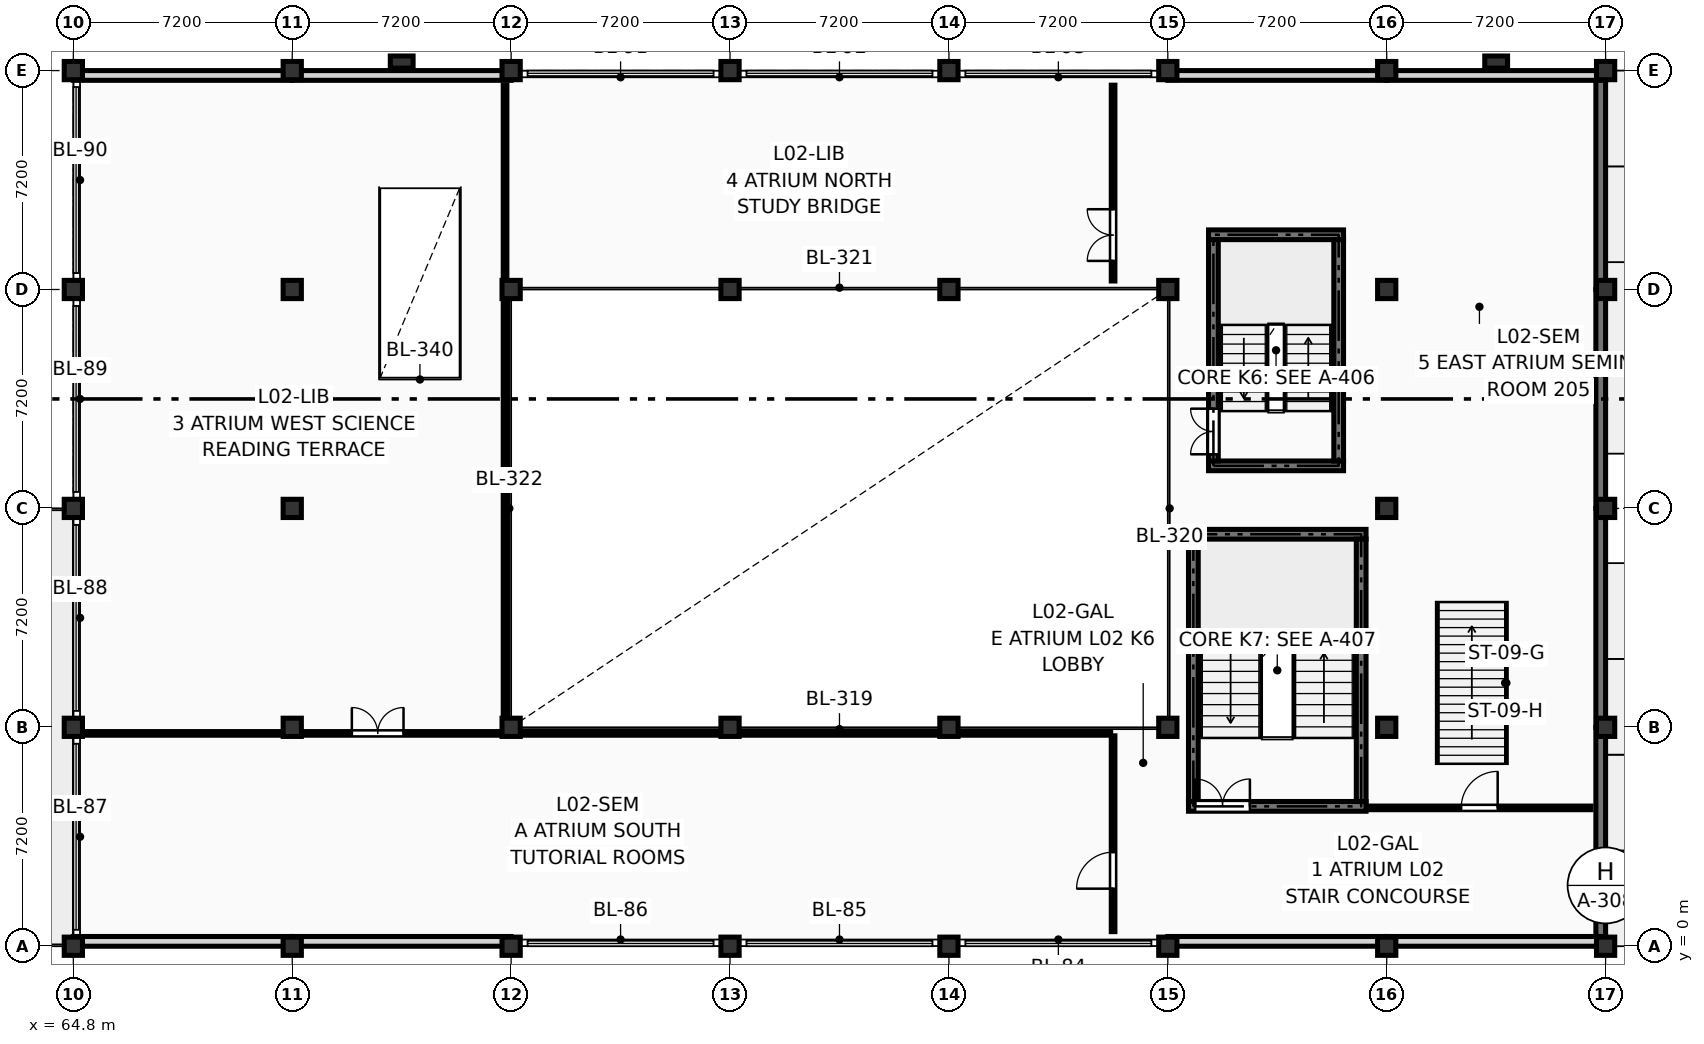
"""IFC4 building model, lengths in metres.
Left out: names, types, materials, properties, quantities, classifications, styles, units other than length and angle.
Written with IfcOpenShell. Run it as: python <this file> out.ifc"""

import sys

from ifc_helpers import new_model, si_unit, direction, frame, frame_2d, origin, origin_2d, place, context, subcontext, project, spatial, rectangle, extrude, element, fill, save


model = new_model("IFC4")
c1 = context("Model", 3, precision=1e-05, world=origin(), true_north=direction((0.0, 1.0)))
c2 = subcontext(c1, "Body", "Model", "MODEL_VIEW")
j1 = project(units=[si_unit("LENGTHUNIT", "METRE"), si_unit("PLANEANGLEUNIT", "RADIAN")], contexts=[c1])
p1 = place(None, origin())
s1 = spatial("IfcSite", under=j1, at=p1, CompositionType="ELEMENT")
p2 = place(p1, origin())
s2 = spatial("IfcBuilding", under=s1, at=p2, CompositionType="ELEMENT")
p3 = place(p2, frame((0.0, 0.0, 8.55)))
s3 = spatial("IfcBuildingStorey", under=s2, at=p3, CompositionType="ELEMENT", Elevation=8.55)
for number, where, z_axis, x_axis in (
    (1, (64.8, 0.0, 0.0), (0.0, 0.0, 1.0), (1.0, 0.0, 0.0)),
    (2, (64.8, 7.2, 0.0), (0.0, 0.0, 1.0), (1.0, 0.0, 0.0)),
    (3, (64.8, 14.4, 0.0), (0.0, 0.0, 1.0), (1.0, 0.0, 0.0)),
    (4, (64.8, 21.6, 0.0), (0.0, 0.0, 1.0), (1.0, 0.0, 0.0)),
    (5, (64.8, 28.8, 0.0), (0.0, 0.0, 1.0), (1.0, 0.0, 0.0)),
    (6, (72.0, 0.0, 0.0), (0.0, 0.0, 1.0), (1.0, 0.0, 0.0)),
    (7, (72.0, 7.2, 0.0), (0.0, 0.0, 1.0), (1.0, 0.0, 0.0)),
    (8, (72.0, 14.4, 0.0), (0.0, 0.0, 1.0), (1.0, 0.0, 0.0)),
    (9, (72.0, 21.6, 0.0), (0.0, 0.0, 1.0), (1.0, 0.0, 0.0)),
    (10, (72.0, 28.8, 0.0), (0.0, 0.0, 1.0), (1.0, 0.0, 0.0)),
    (11, (79.2, 0.0, 0.0), (0.0, 0.0, 1.0), (1.0, 0.0, 0.0)),
    (12, (79.2, 7.2, 0.0), (0.0, 0.0, 1.0), (1.0, 0.0, 0.0)),
    (13, (79.2, 21.6, 0.0), (0.0, 0.0, 1.0), (1.0, 0.0, 0.0)),
    (14, (79.2, 28.8, 0.0), (0.0, 0.0, 1.0), (1.0, 0.0, 0.0)),
    (15, (86.4, 0.0, 0.0), (0.0, 0.0, 1.0), (1.0, 0.0, 0.0)),
    (16, (86.4, 7.2, 0.0), (0.0, 0.0, 1.0), (1.0, 0.0, 0.0)),
    (17, (86.4, 21.6, 0.0), (0.0, 0.0, 1.0), (1.0, 0.0, 0.0)),
    (18, (86.4, 28.8, 0.0), (0.0, 0.0, 1.0), (1.0, 0.0, 0.0)),
    (19, (93.6, 0.0, 0.0), (0.0, 0.0, 1.0), (1.0, 0.0, 0.0)),
    (20, (93.6, 7.2, 0.0), (0.0, 0.0, 1.0), (1.0, 0.0, 0.0)),
    (21, (93.6, 21.6, 0.0), (0.0, 0.0, 1.0), (1.0, 0.0, 0.0)),
    (22, (93.6, 28.8, 0.0), (0.0, 0.0, 1.0), (1.0, 0.0, 0.0)),
    (23, (100.8, 0.0, 0.0), (0.0, 0.0, 1.0), (1.0, 0.0, 0.0)),
    (24, (100.8, 7.2, 0.0), (0.0, 0.0, 1.0), (1.0, 0.0, 0.0)),
    (25, (100.8, 21.6, 0.0), (0.0, 0.0, 1.0), (1.0, 0.0, 0.0)),
    (26, (100.8, 28.8, 0.0), (0.0, 0.0, 1.0), (1.0, 0.0, 0.0)),
    (27, (108.0, 0.0, 0.0), (0.0, 0.0, 1.0), (1.0, 0.0, 0.0)),
    (28, (108.0, 7.2, 0.0), (0.0, 0.0, 1.0), (1.0, 0.0, 0.0)),
    (29, (108.0, 14.4, 0.0), (0.0, 0.0, 1.0), (1.0, 0.0, 0.0)),
    (30, (108.0, 21.6, 0.0), (0.0, 0.0, 1.0), (1.0, 0.0, 0.0)),
    (31, (108.0, 28.8, 0.0), (0.0, 0.0, 1.0), (1.0, 0.0, 0.0)),
    (32, (115.2, 0.0, 0.0), (0.0, 0.0, 1.0), (1.0, 0.0, 0.0)),
    (33, (115.2, 7.2, 0.0), (0.0, 0.0, 1.0), (1.0, 0.0, 0.0)),
    (34, (115.2, 14.4, 0.0), (0.0, 0.0, 1.0), (1.0, 0.0, 0.0)),
    (35, (115.2, 21.6, 0.0), (0.0, 0.0, 1.0), (1.0, 0.0, 0.0)),
    (36, (115.2, 28.8, 0.0), (0.0, 0.0, 1.0), (1.0, 0.0, 0.0)),
):
    element("IfcColumn", number, at=place(p3, frame(where, z_axis=z_axis, x_axis=x_axis)), inside=s3, PredefinedType="COLUMN", context=c2, shape_type="SweptSolid", body=[
        extrude(rectangle(XDim=0.6, YDim=0.6, at=origin_2d()), origin(), (0.0, 0.0, 1.0), 3.6),
    ])
for number, where, z_axis, x_axis in (
    (37, (75.6, 29.08, 0.0), (0.0, 0.0, 1.0), (0.0, 1.0, 0.0)),
    (38, (111.6, 29.08, 0.0), (0.0, 0.0, 1.0), (0.0, 1.0, 0.0)),
):
    element("IfcColumn", number, at=place(p3, frame(where, z_axis=z_axis, x_axis=x_axis)), inside=s3, PredefinedType="PILASTER", context=c2, shape_type="SweptSolid", body=[
        extrude(rectangle(XDim=0.4, YDim=0.75, at=origin_2d()), origin(), (0.0, 0.0, 1.0), 3.6),
    ])
p4 = place(p3, frame((115.04, 21.6, 0.0), z_axis=(0.0, 0.0, 1.0), x_axis=(0.0, 1.0, 0.0)))
e39 = element("IfcWall", 39, at=p4, inside=s3, PredefinedType="SHEAR", context=c2, shape_type="SweptSolid", body=[
    extrude(rectangle(XDim=7.2, YDim=0.32, at=frame_2d((3.6, 0.0))), origin(), (0.0, 0.0, 1.0), 2.84),
])
p5 = place(p3, frame((115.04, 14.4, 0.0), z_axis=(0.0, 0.0, 1.0), x_axis=(0.0, 1.0, 0.0)))
e40 = element("IfcWall", 40, at=p5, inside=s3, PredefinedType="SHEAR", context=c2, shape_type="SweptSolid", body=[
    extrude(rectangle(XDim=7.2, YDim=0.32, at=frame_2d((3.6, 0.0))), origin(), (0.0, 0.0, 1.0), 2.84),
])
for number, where, z_axis, x_axis in (
    (41, (115.04, 7.2, 0.0), (0.0, 0.0, 1.0), (0.0, 1.0, 0.0)),
    (42, (115.04, 0.0, 0.0), (0.0, 0.0, 1.0), (0.0, 1.0, 0.0)),
):
    element("IfcWall", number, at=place(p3, frame(where, z_axis=z_axis, x_axis=x_axis)), inside=s3, PredefinedType="SHEAR", context=c2, shape_type="SweptSolid", body=[
        extrude(rectangle(XDim=7.2, YDim=0.32, at=frame_2d((3.6, 0.0))), origin(), (0.0, 0.0, 1.0), 2.84),
    ])
for number, where, z_axis, x_axis in (
    (43, (108.0, 0.16, 0.0), (0.0, 0.0, 1.0), (1.0, 0.0, 0.0)),
    (44, (100.8, 0.16, 0.0), (0.0, 0.0, 1.0), (1.0, 0.0, 0.0)),
    (45, (72.0, 0.16, 0.0), (0.0, 0.0, 1.0), (1.0, 0.0, 0.0)),
    (46, (64.8, 0.16, 0.0), (0.0, 0.0, 1.0), (1.0, 0.0, 0.0)),
    (47, (64.8, 28.64, 0.0), (0.0, 0.0, 1.0), (1.0, 0.0, 0.0)),
    (48, (72.0, 28.64, 0.0), (0.0, 0.0, 1.0), (1.0, 0.0, 0.0)),
    (49, (100.8, 28.64, 0.0), (0.0, 0.0, 1.0), (1.0, 0.0, 0.0)),
    (50, (108.0, 28.64, 0.0), (0.0, 0.0, 1.0), (1.0, 0.0, 0.0)),
):
    element("IfcWall", number, at=place(p3, frame(where, z_axis=z_axis, x_axis=x_axis)), inside=s3, PredefinedType="SOLIDWALL", context=c2, shape_type="SweptSolid", body=[
        extrude(rectangle(XDim=7.2, YDim=0.32, at=frame_2d((3.6, 0.0))), origin(), (0.0, 0.0, 1.0), 2.84),
    ])
for number, where, z_axis, x_axis in (
    (51, (102.14, 15.8, 0.0), (0.0, 0.0, 1.0), (1.0, 0.0, 0.0)),
    (52, (102.14, 23.4, 0.0), (0.0, 0.0, 1.0), (1.0, 0.0, 0.0)),
):
    element("IfcWall", number, at=place(p3, frame(where, z_axis=z_axis, x_axis=x_axis)), inside=s3, PredefinedType="SHEAR", context=c2, shape_type="SweptSolid", body=[
        extrude(rectangle(XDim=4.44, YDim=0.32, at=frame_2d((2.22, 0.0))), origin(), (0.0, 0.0, 1.0), 3.39),
    ])
p6 = place(p3, frame((102.3, 15.96, 0.0), z_axis=(0.0, 0.0, 1.0), x_axis=(0.0, 1.0, 0.0)))
e53 = element("IfcWall", 53, at=p6, inside=s3, PredefinedType="SHEAR", context=c2, shape_type="SweptSolid", body=[
    extrude(rectangle(XDim=7.28, YDim=0.32, at=frame_2d((3.64, 0.0))), origin(), (0.0, 0.0, 1.0), 3.39),
])
p7 = place(p6, frame((0.22, 0.0, 0.0)))
e54 = element("IfcOpeningElement", 54, at=p7, cuts=e53, PredefinedType="OPENING", context=c2, shape_type="SweptSolid", body=[
    extrude(rectangle(XDim=1.5, YDim=2.2, at=frame_2d((0.75, 1.1))), frame((0.0, 0.172, 0.0), z_axis=(0.0, -1.0, 0.0), x_axis=(1.0, 0.0, 0.0)), (0.0, 0.0, 1.0), 0.344),
])
p8 = place(p3, frame((106.42, 15.96, 0.0), z_axis=(0.0, 0.0, 1.0), x_axis=(0.0, 1.0, 0.0)))
e55 = element("IfcWall", 55, at=p8, inside=s3, PredefinedType="SHEAR", context=c2, shape_type="SweptSolid", body=[
    extrude(rectangle(XDim=7.28, YDim=0.32, at=frame_2d((3.64, 0.0))), origin(), (0.0, 0.0, 1.0), 3.39),
])
p9 = place(p3, frame((101.48, 4.6, 0.0), z_axis=(0.0, 0.0, 1.0), x_axis=(1.0, 0.0, 0.0)))
e56 = element("IfcWall", 56, at=p9, inside=s3, PredefinedType="SHEAR", context=c2, shape_type="SweptSolid", body=[
    extrude(rectangle(XDim=5.84, YDim=0.32, at=frame_2d((2.92, 0.0))), origin(), (0.0, 0.0, 1.0), 3.39),
])
p10 = place(p9, frame((0.22, 0.0, 0.0)))
e57 = element("IfcOpeningElement", 57, at=p10, cuts=e56, PredefinedType="OPENING", context=c2, shape_type="SweptSolid", body=[
    extrude(rectangle(XDim=1.8, YDim=2.2, at=frame_2d((0.9, 1.1))), frame((0.0, 0.172, 0.0), z_axis=(0.0, -1.0, 0.0), x_axis=(1.0, 0.0, 0.0)), (0.0, 0.0, 1.0), 0.344),
])
p11 = place(p3, frame((101.48, 13.55, 0.0), z_axis=(0.0, 0.0, 1.0), x_axis=(1.0, 0.0, 0.0)))
e58 = element("IfcWall", 58, at=p11, inside=s3, PredefinedType="SHEAR", context=c2, shape_type="SweptSolid", body=[
    extrude(rectangle(XDim=5.84, YDim=0.32, at=frame_2d((2.92, 0.0))), origin(), (0.0, 0.0, 1.0), 3.39),
])
for number, where, z_axis, x_axis in (
    (59, (101.64, 4.76, 0.0), (0.0, 0.0, 1.0), (0.0, 1.0, 0.0)),
    (60, (107.16, 4.76, 0.0), (0.0, 0.0, 1.0), (0.0, 1.0, 0.0)),
):
    element("IfcWall", number, at=place(p3, frame(where, z_axis=z_axis, x_axis=x_axis)), inside=s3, PredefinedType="SHEAR", context=c2, shape_type="SweptSolid", body=[
        extrude(rectangle(XDim=8.63, YDim=0.32, at=frame_2d((4.315, 0.0))), origin(), (0.0, 0.0, 1.0), 3.39),
    ])
p12 = place(p3, frame((99.0, 0.48, 0.0), z_axis=(0.0, 0.0, 1.0), x_axis=(0.0, 1.0, 0.0)))
e61 = element("IfcWall", 61, at=p12, inside=s3, PredefinedType="PARTITIONING", context=c2, shape_type="SweptSolid", body=[
    extrude(rectangle(XDim=6.44, YDim=0.12, at=frame_2d((3.22, 0.0))), origin(), (0.0, 0.0, 1.0), 3.375),
])
p13 = place(p12, frame((1.413, 0.0, 0.0)))
e62 = element("IfcOpeningElement", 62, at=p13, cuts=e61, PredefinedType="OPENING", context=c2, shape_type="SweptSolid", body=[
    extrude(rectangle(XDim=1.2, YDim=2.15, at=frame_2d((0.6, 1.075))), frame((0.0, 0.072, 0.0), z_axis=(0.0, -1.0, 0.0), x_axis=(1.0, 0.0, 0.0)), (0.0, 0.0, 1.0), 0.144),
])
p14 = place(p3, frame((65.18, 7.0, 0.0), z_axis=(0.0, 0.0, 1.0), x_axis=(1.0, 0.0, 0.0)))
e63 = element("IfcWall", 63, at=p14, inside=s3, PredefinedType="PARTITIONING", context=c2, shape_type="SweptSolid", body=[
    extrude(rectangle(XDim=33.74, YDim=0.12, at=frame_2d((16.87, 0.0))), origin(), (0.0, 0.0, 1.0), 2.595),
])
p15 = place(p14, frame((8.781, 0.0, 0.0)))
e64 = element("IfcOpeningElement", 64, at=p15, cuts=e63, PredefinedType="OPENING", context=c2, shape_type="SweptSolid", body=[
    extrude(rectangle(XDim=1.7, YDim=2.28, at=frame_2d((0.85, 1.14))), frame((0.0, 0.072, 0.0), z_axis=(0.0, -1.0, 0.0), x_axis=(1.0, 0.0, 0.0)), (0.0, 0.0, 1.0), 0.144),
])
p16 = place(p3, frame((79.0, 7.1, 0.0), z_axis=(0.0, 0.0, 1.0), x_axis=(0.0, 1.0, 0.0)))
e65 = element("IfcWall", 65, at=p16, inside=s3, PredefinedType="PARTITIONING", context=c2, shape_type="SweptSolid", body=[
    extrude(rectangle(XDim=21.22, YDim=0.12, at=frame_2d((10.61, 0.0))), origin(), (0.0, 0.0, 1.0), 3.375),
])
p17 = place(p3, frame((99.0, 21.88, 0.0), z_axis=(0.0, 0.0, 1.0), x_axis=(0.0, 1.0, 0.0)))
e66 = element("IfcWall", 66, at=p17, inside=s3, PredefinedType="PARTITIONING", context=c2, shape_type="SweptSolid", body=[
    extrude(rectangle(XDim=6.44, YDim=0.12, at=frame_2d((3.22, 0.0))), origin(), (0.0, 0.0, 1.0), 3.375),
])
p18 = place(p17, frame((0.66, 0.0, 0.0)))
e67 = element("IfcOpeningElement", 67, at=p18, cuts=e66, PredefinedType="OPENING", context=c2, shape_type="SweptSolid", body=[
    extrude(rectangle(XDim=1.7, YDim=2.28, at=frame_2d((0.85, 1.14))), frame((0.0, 0.072, 0.0), z_axis=(0.0, -1.0, 0.0), x_axis=(1.0, 0.0, 0.0)), (0.0, 0.0, 1.0), 0.144),
])
p19 = place(p3, frame((107.38, 4.55, 0.0), z_axis=(0.0, 0.0, 1.0), x_axis=(1.0, 0.0, 0.0)))
e68 = element("IfcWall", 68, at=p19, inside=s3, PredefinedType="PARTITIONING", context=c2, shape_type="SweptSolid", body=[
    extrude(rectangle(XDim=7.34, YDim=0.12, at=frame_2d((3.67, 0.0))), origin(), (0.0, 0.0, 1.0), 3.375),
])
p20 = place(p19, frame((3.07, 0.0, 0.0)))
e69 = element("IfcOpeningElement", 69, at=p20, cuts=e68, PredefinedType="OPENING", context=c2, shape_type="SweptSolid", body=[
    extrude(rectangle(XDim=1.2, YDim=2.15, at=frame_2d((0.6, 1.075))), frame((0.0, 0.072, 0.0), z_axis=(0.0, -1.0, 0.0), x_axis=(1.0, 0.0, 0.0)), (0.0, 0.0, 1.0), 0.144),
])
p21 = place(p7, origin())
e70 = element("IfcDoor", 70, at=p21, inside=s3, OperationType="DOUBLE_DOOR_SINGLE_SWING", PredefinedType="DOOR", context=c2, shape_type="SweptSolid", body=[
    extrude(rectangle(XDim=1.5, YDim=2.2, at=frame_2d((0.75, 1.1))), frame((0.0, 0.025, 0.0), z_axis=(0.0, -1.0, 0.0), x_axis=(1.0, 0.0, 0.0)), (0.0, 0.0, 1.0), 0.05),
])
fill(e54, e70)
p22 = place(p10, origin())
e71 = element("IfcDoor", 71, at=p22, inside=s3, OperationType="DOUBLE_DOOR_SINGLE_SWING", PredefinedType="DOOR", context=c2, shape_type="SweptSolid", body=[
    extrude(rectangle(XDim=1.8, YDim=2.2, at=frame_2d((0.9, 1.1))), frame((0.0, 0.025, 0.0), z_axis=(0.0, -1.0, 0.0), x_axis=(1.0, 0.0, 0.0)), (0.0, 0.0, 1.0), 0.05),
])
fill(e57, e71)
p23 = place(p13, origin())
e72 = element("IfcDoor", 72, at=p23, inside=s3, OperationType="SINGLE_SWING_LEFT", PredefinedType="DOOR", context=c2, shape_type="SweptSolid", body=[
    extrude(rectangle(XDim=1.2, YDim=2.15, at=frame_2d((0.6, 1.075))), frame((0.0, 0.025, 0.0), z_axis=(0.0, -1.0, 0.0), x_axis=(1.0, 0.0, 0.0)), (0.0, 0.0, 1.0), 0.05),
])
fill(e62, e72)
p24 = place(p15, origin())
e73 = element("IfcDoor", 73, at=p24, inside=s3, OperationType="DOUBLE_DOOR_SINGLE_SWING", PredefinedType="DOOR", context=c2, shape_type="SweptSolid", body=[
    extrude(rectangle(XDim=1.7, YDim=2.28, at=frame_2d((0.85, 1.14))), frame((0.0, 0.025, 0.0), z_axis=(0.0, -1.0, 0.0), x_axis=(1.0, 0.0, 0.0)), (0.0, 0.0, 1.0), 0.05),
])
fill(e64, e73)
p25 = place(p18, origin())
e74 = element("IfcDoor", 74, at=p25, inside=s3, OperationType="DOUBLE_DOOR_SINGLE_SWING", PredefinedType="DOOR", context=c2, shape_type="SweptSolid", body=[
    extrude(rectangle(XDim=1.7, YDim=2.28, at=frame_2d((0.85, 1.14))), frame((0.0, 0.025, 0.0), z_axis=(0.0, -1.0, 0.0), x_axis=(1.0, 0.0, 0.0)), (0.0, 0.0, 1.0), 0.05),
])
fill(e67, e74)
p26 = place(p20, origin())
e75 = element("IfcDoor", 75, at=p26, inside=s3, OperationType="SINGLE_SWING_RIGHT", PredefinedType="DOOR", context=c2, shape_type="SweptSolid", body=[
    extrude(rectangle(XDim=1.2, YDim=2.15, at=frame_2d((0.6, 1.075))), frame((0.0, 0.025, 0.0), z_axis=(0.0, -1.0, 0.0), x_axis=(1.0, 0.0, 0.0)), (0.0, 0.0, 1.0), 0.05),
])
fill(e69, e75)
save(model, sys.argv[1])
